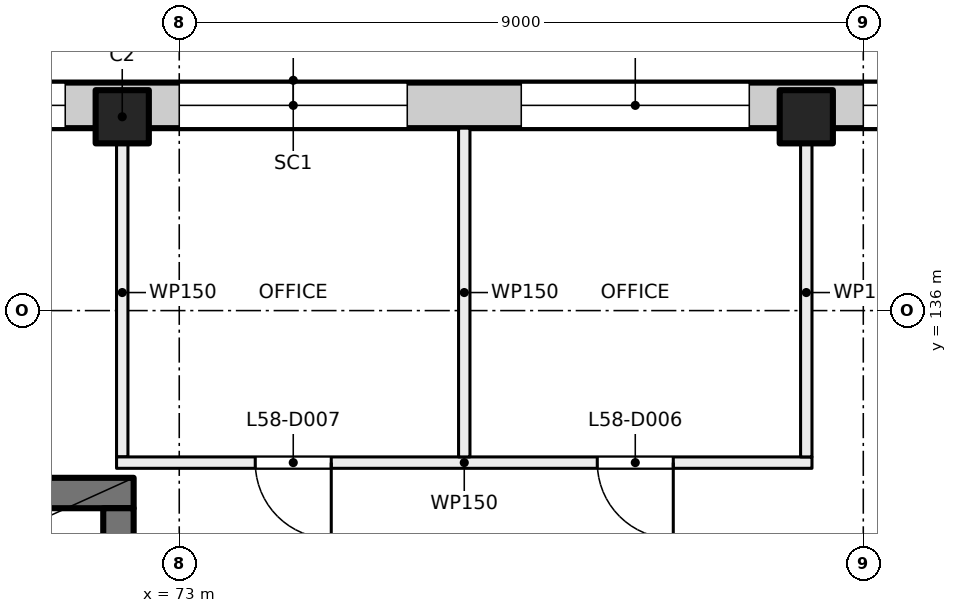
"""IFC4 building model, lengths in metres.
Left out: names, types, materials, properties, quantities, classifications, styles, units other than length and angle.
Written with IfcOpenShell. Run it as: python <this file> out.ifc"""

import sys

from ifc_helpers import new_model, si_unit, direction, frame, frame_2d, origin, origin_2d, place, context, subcontext, project, spatial, rectangle, extrude, element, fill, save


model = new_model("IFC4")
c1 = context("Model", 3, precision=1e-05, world=origin(), true_north=direction((0.0, 1.0)))
c2 = subcontext(c1, "Body", "Model", "MODEL_VIEW")
j1 = project(units=[si_unit("LENGTHUNIT", "METRE"), si_unit("PLANEANGLEUNIT", "RADIAN")], contexts=[c1])
p1 = place(None, origin())
s1 = spatial("IfcSite", under=j1, at=p1, CompositionType="ELEMENT")
p2 = place(p1, origin())
s2 = spatial("IfcBuilding", under=s1, at=p2, CompositionType="ELEMENT")
p3 = place(p2, frame((0.0, 0.0, 245.5)))
s3 = spatial("IfcBuildingStorey", under=s2, at=p3, CompositionType="ELEMENT", Elevation=245.5)
for number, where, z_axis, x_axis in (
    (1, (72.25, 138.55, 0.0), (0.0, 0.0, 1.0), (1.0, 0.0, 0.0)),
    (2, (81.25, 138.55, 0.0), (0.0, 0.0, 1.0), (1.0, 0.0, 0.0)),
):
    element("IfcColumn", number, at=place(p3, frame(where, z_axis=z_axis, x_axis=x_axis)), inside=s3, PredefinedType="COLUMN", context=c2, shape_type="SweptSolid", body=[
        extrude(rectangle(XDim=0.7, YDim=0.7, at=origin_2d()), origin(), (0.0, 0.0, 1.0), 4.0),
    ])
p4 = place(p3, frame((64.0, 133.6, 0.0), z_axis=(0.0, 0.0, 1.0), x_axis=(1.0, 0.0, 0.0)))
e3 = element("IfcWall", 3, at=p4, inside=s3, PredefinedType="SHEAR", context=c2, shape_type="SweptSolid", body=[
    extrude(rectangle(XDim=8.4, YDim=0.4, at=frame_2d((4.2, 0.0))), origin(), (0.0, 0.0, 1.0), 4.0),
])
p5 = place(p3, frame((72.2, 130.4, 0.0), z_axis=(0.0, 0.0, 1.0), x_axis=(0.0, 1.0, 0.0)))
e4 = element("IfcWall", 4, at=p5, inside=s3, PredefinedType="SHEAR", context=c2, shape_type="SweptSolid", body=[
    extrude(rectangle(XDim=3.0, YDim=0.4, at=frame_2d((1.5, 0.0))), origin(), (0.0, 0.0, 1.0), 4.0),
])
p6 = place(p3, frame((47.07, 138.7, 0.0), z_axis=(0.0, 0.0, 1.0), x_axis=(1.0, 0.0, 0.0)))
e5 = element("IfcWall", 5, at=p6, inside=s3, PredefinedType="SOLIDWALL", context=c2, shape_type="SweptSolid", body=[
    extrude(rectangle(XDim=43.91, YDim=0.6, at=frame_2d((21.955, 0.0))), origin(), (0.0, 0.0, 1.0), 3.625),
])
p7 = place(p6, frame((3.43, 0.0, 0.9)))
e6 = element("IfcOpeningElement", 6, at=p7, cuts=e5, PredefinedType="OPENING", context=c2, shape_type="SweptSolid", body=[
    extrude(rectangle(XDim=3.0, YDim=2.4, at=frame_2d((1.5, 1.2))), frame((0.0, 0.31, 0.0), z_axis=(0.0, -1.0, 0.0), x_axis=(1.0, 0.0, 0.0)), (0.0, 0.0, 1.0), 0.62),
])
p8 = place(p6, frame((7.93, 0.0, 0.9)))
e7 = element("IfcOpeningElement", 7, at=p8, cuts=e5, PredefinedType="OPENING", context=c2, shape_type="SweptSolid", body=[
    extrude(rectangle(XDim=3.0, YDim=2.4, at=frame_2d((1.5, 1.2))), frame((0.0, 0.31, 0.0), z_axis=(0.0, -1.0, 0.0), x_axis=(1.0, 0.0, 0.0)), (0.0, 0.0, 1.0), 0.62),
])
p9 = place(p6, frame((12.43, 0.0, 0.9)))
e8 = element("IfcOpeningElement", 8, at=p9, cuts=e5, PredefinedType="OPENING", context=c2, shape_type="SweptSolid", body=[
    extrude(rectangle(XDim=3.0, YDim=2.4, at=frame_2d((1.5, 1.2))), frame((0.0, 0.31, 0.0), z_axis=(0.0, -1.0, 0.0), x_axis=(1.0, 0.0, 0.0)), (0.0, 0.0, 1.0), 0.62),
])
p10 = place(p6, frame((16.93, 0.0, 0.9)))
e9 = element("IfcOpeningElement", 9, at=p10, cuts=e5, PredefinedType="OPENING", context=c2, shape_type="SweptSolid", body=[
    extrude(rectangle(XDim=3.0, YDim=2.4, at=frame_2d((1.5, 1.2))), frame((0.0, 0.31, 0.0), z_axis=(0.0, -1.0, 0.0), x_axis=(1.0, 0.0, 0.0)), (0.0, 0.0, 1.0), 0.62),
])
p11 = place(p6, frame((21.43, 0.0, 0.9)))
e10 = element("IfcOpeningElement", 10, at=p11, cuts=e5, PredefinedType="OPENING", context=c2, shape_type="SweptSolid", body=[
    extrude(rectangle(XDim=3.0, YDim=2.4, at=frame_2d((1.5, 1.2))), frame((0.0, 0.31, 0.0), z_axis=(0.0, -1.0, 0.0), x_axis=(1.0, 0.0, 0.0)), (0.0, 0.0, 1.0), 0.62),
])
p12 = place(p6, frame((25.93, 0.0, 0.9)))
e11 = element("IfcOpeningElement", 11, at=p12, cuts=e5, PredefinedType="OPENING", context=c2, shape_type="SweptSolid", body=[
    extrude(rectangle(XDim=3.0, YDim=2.4, at=frame_2d((1.5, 1.2))), frame((0.0, 0.31, 0.0), z_axis=(0.0, -1.0, 0.0), x_axis=(1.0, 0.0, 0.0)), (0.0, 0.0, 1.0), 0.62),
])
p13 = place(p6, frame((30.43, 0.0, 0.9)))
e12 = element("IfcOpeningElement", 12, at=p13, cuts=e5, PredefinedType="OPENING", context=c2, shape_type="SweptSolid", body=[
    extrude(rectangle(XDim=3.0, YDim=2.4, at=frame_2d((1.5, 1.2))), frame((0.0, 0.31, 0.0), z_axis=(0.0, -1.0, 0.0), x_axis=(1.0, 0.0, 0.0)), (0.0, 0.0, 1.0), 0.62),
])
p14 = place(p6, frame((34.93, 0.0, 0.9)))
e13 = element("IfcOpeningElement", 13, at=p14, cuts=e5, PredefinedType="OPENING", context=c2, shape_type="SweptSolid", body=[
    extrude(rectangle(XDim=3.0, YDim=2.4, at=frame_2d((1.5, 1.2))), frame((0.0, 0.31, 0.0), z_axis=(0.0, -1.0, 0.0), x_axis=(1.0, 0.0, 0.0)), (0.0, 0.0, 1.0), 0.62),
])
p15 = place(p6, frame((39.43, 0.0, 0.9)))
e14 = element("IfcOpeningElement", 14, at=p15, cuts=e5, PredefinedType="OPENING", context=c2, shape_type="SweptSolid", body=[
    extrude(rectangle(XDim=3.0, YDim=2.4, at=frame_2d((1.5, 1.2))), frame((0.0, 0.31, 0.0), z_axis=(0.0, -1.0, 0.0), x_axis=(1.0, 0.0, 0.0)), (0.0, 0.0, 1.0), 0.62),
])
p16 = place(p3, frame((72.25, 134.075, 0.0), z_axis=(0.0, 0.0, 1.0), x_axis=(0.0, 1.0, 0.0)))
e15 = element("IfcWall", 15, at=p16, inside=s3, PredefinedType="PARTITIONING", context=c2, shape_type="SweptSolid", body=[
    extrude(rectangle(XDim=4.325, YDim=0.15, at=frame_2d((2.163, 0.0))), origin(), (0.0, 0.0, 1.0), 3.625),
])
p17 = place(p3, frame((81.325, 134.0, 0.0), z_axis=(0.0, 0.0, 1.0), x_axis=(-1.0, 0.0, 0.0)))
e16 = element("IfcWall", 16, at=p17, inside=s3, PredefinedType="PARTITIONING", context=c2, shape_type="SweptSolid", body=[
    extrude(rectangle(XDim=9.15, YDim=0.15, at=frame_2d((4.575, 0.0))), origin(), (0.0, 0.0, 1.0), 3.625),
])
p18 = place(p17, frame((1.825, 0.0, 0.0)))
e17 = element("IfcOpeningElement", 17, at=p18, cuts=e16, PredefinedType="OPENING", context=c2, shape_type="SweptSolid", body=[
    extrude(rectangle(XDim=1.0, YDim=2.1, at=frame_2d((0.5, 1.05))), frame((0.0, 0.085, 0.0), z_axis=(0.0, -1.0, 0.0), x_axis=(1.0, 0.0, 0.0)), (0.0, 0.0, 1.0), 0.17),
])
p19 = place(p17, frame((6.325, 0.0, 0.0)))
e18 = element("IfcOpeningElement", 18, at=p19, cuts=e16, PredefinedType="OPENING", context=c2, shape_type="SweptSolid", body=[
    extrude(rectangle(XDim=1.0, YDim=2.1, at=frame_2d((0.5, 1.05))), frame((0.0, 0.085, 0.0), z_axis=(0.0, -1.0, 0.0), x_axis=(1.0, 0.0, 0.0)), (0.0, 0.0, 1.0), 0.17),
])
for number, where, z_axis, x_axis in (
    (19, (76.75, 134.075, 0.0), (0.0, 0.0, 1.0), (0.0, 1.0, 0.0)),
    (20, (81.25, 138.4, 0.0), (0.0, 0.0, 1.0), (0.0, -1.0, 0.0)),
):
    element("IfcWall", number, at=place(p3, frame(where, z_axis=z_axis, x_axis=x_axis)), inside=s3, PredefinedType="PARTITIONING", context=c2, shape_type="SweptSolid", body=[
        extrude(rectangle(XDim=4.325, YDim=0.15, at=frame_2d((2.163, 0.0))), origin(), (0.0, 0.0, 1.0), 3.625),
    ])
p20 = place(p11, origin())
e21 = element("IfcWindow", 21, at=p20, inside=s3, PartitioningType="SINGLE_PANEL", PredefinedType="WINDOW", context=c2, shape_type="SweptSolid", body=[
    extrude(rectangle(XDim=3.0, YDim=2.4, at=frame_2d((1.5, 1.2))), frame((0.0, 0.03, 0.0), z_axis=(0.0, -1.0, 0.0), x_axis=(1.0, 0.0, 0.0)), (0.0, 0.0, 1.0), 0.06),
])
fill(e10, e21)
p21 = place(p12, origin())
e22 = element("IfcWindow", 22, at=p21, inside=s3, PartitioningType="SINGLE_PANEL", PredefinedType="WINDOW", context=c2, shape_type="SweptSolid", body=[
    extrude(rectangle(XDim=3.0, YDim=2.4, at=frame_2d((1.5, 1.2))), frame((0.0, 0.03, 0.0), z_axis=(0.0, -1.0, 0.0), x_axis=(1.0, 0.0, 0.0)), (0.0, 0.0, 1.0), 0.06),
])
fill(e11, e22)
p22 = place(p13, origin())
e23 = element("IfcWindow", 23, at=p22, inside=s3, PartitioningType="SINGLE_PANEL", PredefinedType="WINDOW", context=c2, shape_type="SweptSolid", body=[
    extrude(rectangle(XDim=3.0, YDim=2.4, at=frame_2d((1.5, 1.2))), frame((0.0, 0.03, 0.0), z_axis=(0.0, -1.0, 0.0), x_axis=(1.0, 0.0, 0.0)), (0.0, 0.0, 1.0), 0.06),
])
fill(e12, e23)
p23 = place(p14, origin())
e24 = element("IfcWindow", 24, at=p23, inside=s3, PartitioningType="SINGLE_PANEL", PredefinedType="WINDOW", context=c2, shape_type="SweptSolid", body=[
    extrude(rectangle(XDim=3.0, YDim=2.4, at=frame_2d((1.5, 1.2))), frame((0.0, 0.03, 0.0), z_axis=(0.0, -1.0, 0.0), x_axis=(1.0, 0.0, 0.0)), (0.0, 0.0, 1.0), 0.06),
])
fill(e13, e24)
p24 = place(p18, origin())
e25 = element("IfcDoor", 25, at=p24, inside=s3, OperationType="SINGLE_SWING_LEFT", PredefinedType="DOOR", context=c2, shape_type="SweptSolid", body=[
    extrude(rectangle(XDim=1.0, YDim=2.1, at=frame_2d((0.5, 1.05))), frame((0.0, 0.025, 0.0), z_axis=(0.0, -1.0, 0.0), x_axis=(1.0, 0.0, 0.0)), (0.0, 0.0, 1.0), 0.05),
])
fill(e17, e25)
p25 = place(p19, origin())
e26 = element("IfcDoor", 26, at=p25, inside=s3, OperationType="SINGLE_SWING_RIGHT", PredefinedType="DOOR", context=c2, shape_type="SweptSolid", body=[
    extrude(rectangle(XDim=1.0, YDim=2.1, at=frame_2d((0.5, 1.05))), frame((0.0, 0.025, 0.0), z_axis=(0.0, -1.0, 0.0), x_axis=(1.0, 0.0, 0.0)), (0.0, 0.0, 1.0), 0.05),
])
fill(e18, e26)
save(model, sys.argv[1])
